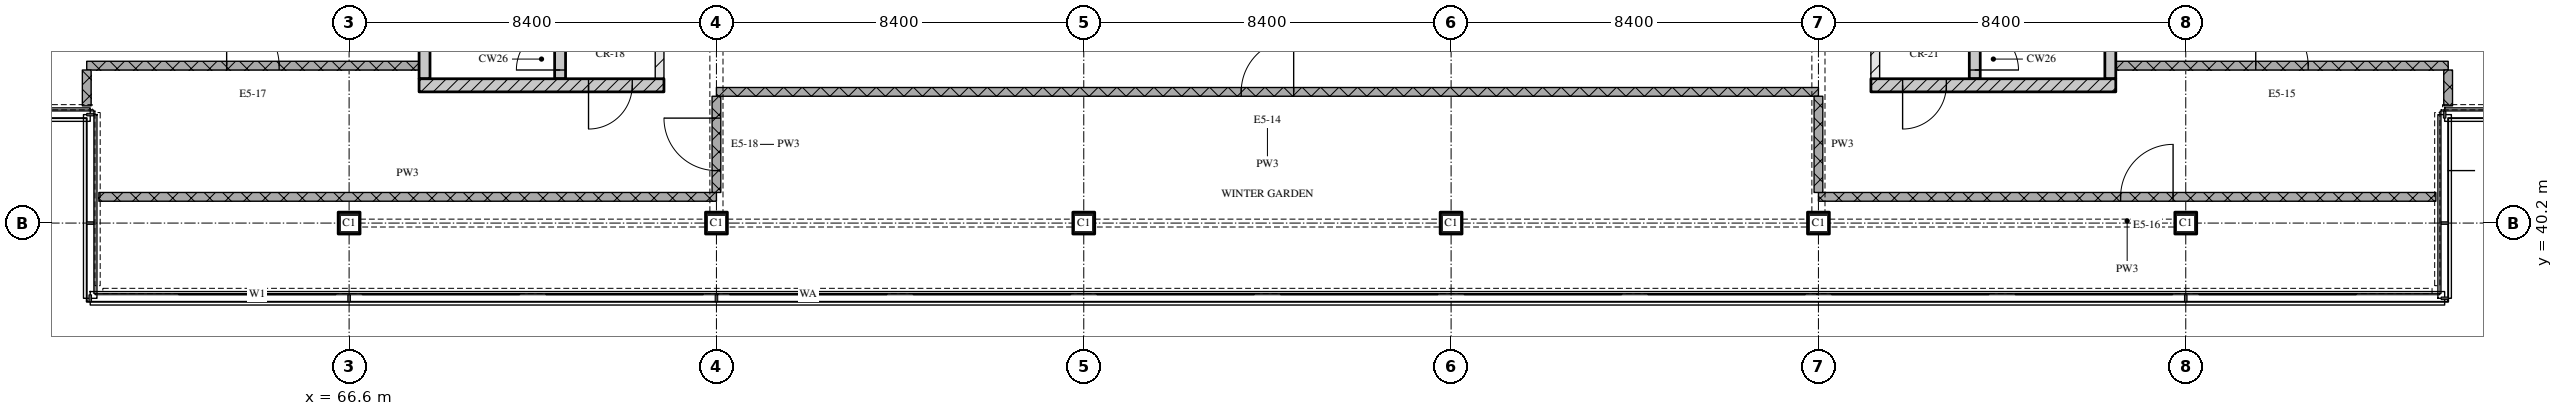
"""IFC4 building model, lengths in metres.
Left out: names, types, materials, properties, quantities, classifications, styles, units other than length and angle.
Written with IfcOpenShell. Run it as: python <this file> out.ifc"""

import sys

from ifc_helpers import new_model, si_unit, direction, frame, frame_2d, origin, origin_2d, place, context, subcontext, project, spatial, rectangle, extrude, element, fill, save


model = new_model("IFC4")
c1 = context("Model", 3, precision=1e-05, world=origin(), true_north=direction((0.0, 1.0)))
c2 = subcontext(c1, "Body", "Model", "MODEL_VIEW")
j1 = project(units=[si_unit("LENGTHUNIT", "METRE"), si_unit("PLANEANGLEUNIT", "RADIAN")], contexts=[c1])
p1 = place(None, origin())
s1 = spatial("IfcSite", under=j1, at=p1, CompositionType="ELEMENT")
p2 = place(p1, origin())
s2 = spatial("IfcBuilding", under=s1, at=p2, CompositionType="ELEMENT")
p3 = place(p2, frame((0.0, 0.0, 288.75)))
s3 = spatial("IfcBuildingStorey", under=s2, at=p3, CompositionType="ELEMENT", Elevation=288.75)
for number, where, z_axis, x_axis in (
    (1, (66.6, 40.2, 0.0), (0.0, 0.0, 1.0), (1.0, 0.0, 0.0)),
    (2, (75.0, 40.2, 0.0), (0.0, 0.0, 1.0), (1.0, 0.0, 0.0)),
    (3, (83.4, 40.2, 0.0), (0.0, 0.0, 1.0), (1.0, 0.0, 0.0)),
    (4, (91.8, 40.2, 0.0), (0.0, 0.0, 1.0), (1.0, 0.0, 0.0)),
    (5, (100.2, 40.2, 0.0), (0.0, 0.0, 1.0), (1.0, 0.0, 0.0)),
    (6, (108.6, 40.2, 0.0), (0.0, 0.0, 1.0), (1.0, 0.0, 0.0)),
):
    element("IfcColumn", number, at=place(p3, frame(where, z_axis=z_axis, x_axis=x_axis)), inside=s3, PredefinedType="COLUMN", context=c2, shape_type="SweptSolid", body=[
        extrude(rectangle(XDim=0.5, YDim=0.5, at=origin_2d()), origin(), (0.0, 0.0, 1.0), 3.6),
    ])
p4 = place(p3, frame((68.2, 43.35, 0.0), z_axis=(0.0, 0.0, 1.0), x_axis=(1.0, 0.0, 0.0)))
e7 = element("IfcWall", 7, at=p4, inside=s3, PredefinedType="SOLIDWALL", context=c2, shape_type="SweptSolid", body=[
    extrude(rectangle(XDim=5.6, YDim=0.3, at=frame_2d((2.8, 0.0))), origin(), (0.0, 0.0, 1.0), 3.32),
])
p5 = place(p4, frame((3.875, 0.0, 0.0)))
e8 = element("IfcOpeningElement", 8, at=p5, cuts=e7, PredefinedType="OPENING", context=c2, shape_type="SweptSolid", body=[
    extrude(rectangle(XDim=1.0, YDim=2.1, at=frame_2d((0.5, 1.05))), frame((0.0, 0.16, 0.0), z_axis=(0.0, -1.0, 0.0), x_axis=(1.0, 0.0, 0.0)), (0.0, 0.0, 1.0), 0.32),
])
p6 = place(p3, frame((68.325, 43.5, 0.0), z_axis=(0.0, 0.0, 1.0), x_axis=(0.0, 1.0, 0.0)))
e9 = element("IfcWall", 9, at=p6, inside=s3, PredefinedType="SOLIDWALL", context=c2, shape_type="SweptSolid", body=[
    extrude(rectangle(XDim=6.9, YDim=0.25, at=frame_2d((3.45, 0.0))), origin(), (0.0, 0.0, 1.0), 3.32),
])
p7 = place(p3, frame((71.425, 43.5, 0.0), z_axis=(0.0, 0.0, 1.0), x_axis=(0.0, 1.0, 0.0)))
e10 = element("IfcWall", 10, at=p7, inside=s3, PredefinedType="SOLIDWALL", context=c2, shape_type="SweptSolid", body=[
    extrude(rectangle(XDim=6.9, YDim=0.25, at=frame_2d((3.45, 0.0))), origin(), (0.0, 0.0, 1.0), 3.32),
])
p8 = place(p7, frame((0.2, 0.0, 0.0)))
e11 = element("IfcOpeningElement", 11, at=p8, cuts=e10, PredefinedType="OPENING", context=c2, shape_type="SweptSolid", body=[
    extrude(rectangle(XDim=1.0, YDim=2.1, at=frame_2d((0.5, 1.05))), frame((0.0, 0.135, 0.0), z_axis=(0.0, -1.0, 0.0), x_axis=(1.0, 0.0, 0.0)), (0.0, 0.0, 1.0), 0.27),
])
p9 = place(p3, frame((73.7, 43.5, 0.0), z_axis=(0.0, 0.0, 1.0), x_axis=(0.0, 1.0, 0.0)))
e12 = element("IfcWall", 12, at=p9, inside=s3, PredefinedType="PARTITIONING", context=c2, shape_type="SweptSolid", body=[
    extrude(rectangle(XDim=6.9, YDim=0.2, at=frame_2d((3.45, 0.0))), origin(), (0.0, 0.0, 1.0), 3.32),
])
p10 = place(p9, frame((1.0, 0.0, 0.0)))
e13 = element("IfcOpeningElement", 13, at=p10, cuts=e12, PredefinedType="OPENING", context=c2, shape_type="SweptSolid", body=[
    extrude(rectangle(XDim=1.0, YDim=2.1, at=frame_2d((0.5, 1.05))), frame((0.0, 0.11, 0.0), z_axis=(0.0, -1.0, 0.0), x_axis=(1.0, 0.0, 0.0)), (0.0, 0.0, 1.0), 0.22),
])
p11 = place(p3, frame((101.4, 43.35, 0.0), z_axis=(0.0, 0.0, 1.0), x_axis=(1.0, 0.0, 0.0)))
e14 = element("IfcWall", 14, at=p11, inside=s3, PredefinedType="SOLIDWALL", context=c2, shape_type="SweptSolid", body=[
    extrude(rectangle(XDim=5.6, YDim=0.3, at=frame_2d((2.8, 0.0))), origin(), (0.0, 0.0, 1.0), 3.32),
])
p12 = place(p11, frame((0.725, 0.0, 0.0)))
e15 = element("IfcOpeningElement", 15, at=p12, cuts=e14, PredefinedType="OPENING", context=c2, shape_type="SweptSolid", body=[
    extrude(rectangle(XDim=1.0, YDim=2.1, at=frame_2d((0.5, 1.05))), frame((0.0, 0.16, 0.0), z_axis=(0.0, -1.0, 0.0), x_axis=(1.0, 0.0, 0.0)), (0.0, 0.0, 1.0), 0.32),
])
p13 = place(p3, frame((101.5, 43.5, 0.0), z_axis=(0.0, 0.0, 1.0), x_axis=(0.0, 1.0, 0.0)))
e16 = element("IfcWall", 16, at=p13, inside=s3, PredefinedType="PARTITIONING", context=c2, shape_type="SweptSolid", body=[
    extrude(rectangle(XDim=6.9, YDim=0.2, at=frame_2d((3.45, 0.0))), origin(), (0.0, 0.0, 1.0), 3.32),
])
p14 = place(p13, frame((1.0, 0.0, 0.0)))
e17 = element("IfcOpeningElement", 17, at=p14, cuts=e16, PredefinedType="OPENING", context=c2, shape_type="SweptSolid", body=[
    extrude(rectangle(XDim=1.0, YDim=2.1, at=frame_2d((0.5, 1.05))), frame((0.0, 0.11, 0.0), z_axis=(0.0, -1.0, 0.0), x_axis=(1.0, 0.0, 0.0)), (0.0, 0.0, 1.0), 0.22),
])
p15 = place(p3, frame((103.775, 43.5, 0.0), z_axis=(0.0, 0.0, 1.0), x_axis=(0.0, 1.0, 0.0)))
e18 = element("IfcWall", 18, at=p15, inside=s3, PredefinedType="SOLIDWALL", context=c2, shape_type="SweptSolid", body=[
    extrude(rectangle(XDim=6.9, YDim=0.25, at=frame_2d((3.45, 0.0))), origin(), (0.0, 0.0, 1.0), 3.32),
])
p16 = place(p15, frame((0.2, 0.0, 0.0)))
e19 = element("IfcOpeningElement", 19, at=p16, cuts=e18, PredefinedType="OPENING", context=c2, shape_type="SweptSolid", body=[
    extrude(rectangle(XDim=1.0, YDim=2.1, at=frame_2d((0.5, 1.05))), frame((0.0, 0.135, 0.0), z_axis=(0.0, -1.0, 0.0), x_axis=(1.0, 0.0, 0.0)), (0.0, 0.0, 1.0), 0.27),
])
p17 = place(p3, frame((106.875, 43.5, 0.0), z_axis=(0.0, 0.0, 1.0), x_axis=(0.0, 1.0, 0.0)))
e20 = element("IfcWall", 20, at=p17, inside=s3, PredefinedType="SOLIDWALL", context=c2, shape_type="SweptSolid", body=[
    extrude(rectangle(XDim=6.9, YDim=0.25, at=frame_2d((3.45, 0.0))), origin(), (0.0, 0.0, 1.0), 3.32),
])
p18 = place(p3, frame((60.88, 40.8, 0.0), z_axis=(0.0, 0.0, 1.0), x_axis=(1.0, 0.0, 0.0)))
e21 = element("IfcWall", 21, at=p18, inside=s3, PredefinedType="PARTITIONING", context=c2, shape_type="SweptSolid", body=[
    extrude(rectangle(XDim=14.12, YDim=0.2, at=frame_2d((7.06, 0.0))), origin(), (0.0, 0.0, 1.0), 3.32),
])
p19 = place(p3, frame((114.32, 40.8, 0.0), z_axis=(0.0, 0.0, 1.0), x_axis=(-1.0, 0.0, 0.0)))
e22 = element("IfcWall", 22, at=p19, inside=s3, PredefinedType="PARTITIONING", context=c2, shape_type="SweptSolid", body=[
    extrude(rectangle(XDim=14.12, YDim=0.2, at=frame_2d((7.06, 0.0))), origin(), (0.0, 0.0, 1.0), 3.32),
])
p20 = place(p19, frame((6.01, 0.0, 0.0)))
e23 = element("IfcOpeningElement", 23, at=p20, cuts=e22, PredefinedType="OPENING", context=c2, shape_type="SweptSolid", body=[
    extrude(rectangle(XDim=1.2, YDim=2.1, at=frame_2d((0.6, 1.05))), frame((0.0, 0.11, 0.0), z_axis=(0.0, -1.0, 0.0), x_axis=(1.0, 0.0, 0.0)), (0.0, 0.0, 1.0), 0.22),
])
p21 = place(p3, frame((100.2, 43.2, 0.0), z_axis=(0.0, 0.0, 1.0), x_axis=(-1.0, 0.0, 0.0)))
e24 = element("IfcWall", 24, at=p21, inside=s3, PredefinedType="PARTITIONING", context=c2, shape_type="SweptSolid", body=[
    extrude(rectangle(XDim=25.2, YDim=0.2, at=frame_2d((12.6, 0.0))), origin(), (0.0, 0.0, 1.0), 3.32),
])
p22 = place(p21, frame((12.0, 0.0, 0.0)))
e25 = element("IfcOpeningElement", 25, at=p22, cuts=e24, PredefinedType="OPENING", context=c2, shape_type="SweptSolid", body=[
    extrude(rectangle(XDim=1.2, YDim=2.1, at=frame_2d((0.6, 1.05))), frame((0.0, 0.11, 0.0), z_axis=(0.0, -1.0, 0.0), x_axis=(1.0, 0.0, 0.0)), (0.0, 0.0, 1.0), 0.22),
])
p23 = place(p3, frame((60.6, 43.8, 0.0), z_axis=(0.0, 0.0, 1.0), x_axis=(1.0, 0.0, 0.0)))
e26 = element("IfcWall", 26, at=p23, inside=s3, PredefinedType="PARTITIONING", context=c2, shape_type="SweptSolid", body=[
    extrude(rectangle(XDim=7.6, YDim=0.2, at=frame_2d((3.8, 0.0))), origin(), (0.0, 0.0, 1.0), 3.32),
])
p24 = place(p23, frame((3.2, 0.0, 0.0)))
e27 = element("IfcOpeningElement", 27, at=p24, cuts=e26, PredefinedType="OPENING", context=c2, shape_type="SweptSolid", body=[
    extrude(rectangle(XDim=1.2, YDim=2.1, at=frame_2d((0.6, 1.05))), frame((0.0, 0.11, 0.0), z_axis=(0.0, -1.0, 0.0), x_axis=(1.0, 0.0, 0.0)), (0.0, 0.0, 1.0), 0.22),
])
p25 = place(p3, frame((107.0, 43.8, 0.0), z_axis=(0.0, 0.0, 1.0), x_axis=(1.0, 0.0, 0.0)))
e28 = element("IfcWall", 28, at=p25, inside=s3, PredefinedType="PARTITIONING", context=c2, shape_type="SweptSolid", body=[
    extrude(rectangle(XDim=7.6, YDim=0.2, at=frame_2d((3.8, 0.0))), origin(), (0.0, 0.0, 1.0), 3.32),
])
p26 = place(p25, frame((3.2, 0.0, 0.0)))
e29 = element("IfcOpeningElement", 29, at=p26, cuts=e28, PredefinedType="OPENING", context=c2, shape_type="SweptSolid", body=[
    extrude(rectangle(XDim=1.2, YDim=2.1, at=frame_2d((0.6, 1.05))), frame((0.0, 0.11, 0.0), z_axis=(0.0, -1.0, 0.0), x_axis=(1.0, 0.0, 0.0)), (0.0, 0.0, 1.0), 0.22),
])
p27 = place(p3, frame((60.6, 43.7, 0.0), z_axis=(0.0, 0.0, 1.0), x_axis=(0.0, -1.0, 0.0)))
e30 = element("IfcWall", 30, at=p27, inside=s3, PredefinedType="PARTITIONING", context=c2, shape_type="SweptSolid", body=[
    extrude(rectangle(XDim=0.82, YDim=0.2, at=frame_2d((0.41, 0.0))), origin(), (0.0, 0.0, 1.0), 3.32),
])
p28 = place(p3, frame((75.0, 43.1, 0.0), z_axis=(0.0, 0.0, 1.0), x_axis=(0.0, -1.0, 0.0)))
e31 = element("IfcWall", 31, at=p28, inside=s3, PredefinedType="PARTITIONING", context=c2, shape_type="SweptSolid", body=[
    extrude(rectangle(XDim=2.2, YDim=0.2, at=frame_2d((1.1, 0.0))), origin(), (0.0, 0.0, 1.0), 2.53),
])
p29 = place(p28, frame((0.5, 0.0, 0.0)))
e32 = element("IfcOpeningElement", 32, at=p29, cuts=e31, PredefinedType="OPENING", context=c2, shape_type="SweptSolid", body=[
    extrude(rectangle(XDim=1.2, YDim=2.1, at=frame_2d((0.6, 1.05))), frame((0.0, 0.11, 0.0), z_axis=(0.0, -1.0, 0.0), x_axis=(1.0, 0.0, 0.0)), (0.0, 0.0, 1.0), 0.22),
])
p30 = place(p3, frame((100.2, 43.1, 0.0), z_axis=(0.0, 0.0, 1.0), x_axis=(0.0, -1.0, 0.0)))
e33 = element("IfcWall", 33, at=p30, inside=s3, PredefinedType="PARTITIONING", context=c2, shape_type="SweptSolid", body=[
    extrude(rectangle(XDim=2.2, YDim=0.2, at=frame_2d((1.1, 0.0))), origin(), (0.0, 0.0, 1.0), 2.53),
])
p31 = place(p3, frame((114.6, 43.7, 0.0), z_axis=(0.0, 0.0, 1.0), x_axis=(0.0, -1.0, 0.0)))
e34 = element("IfcWall", 34, at=p31, inside=s3, PredefinedType="PARTITIONING", context=c2, shape_type="SweptSolid", body=[
    extrude(rectangle(XDim=0.82, YDim=0.2, at=frame_2d((0.41, 0.0))), origin(), (0.0, 0.0, 1.0), 3.32),
])
p32 = place(p5, origin())
e35 = element("IfcDoor", 35, at=p32, inside=s3, OperationType="SINGLE_SWING_RIGHT", PredefinedType="DOOR", context=c2, shape_type="SweptSolid", body=[
    extrude(rectangle(XDim=1.0, YDim=2.1, at=frame_2d((0.5, 1.05))), frame((0.0, 0.025, 0.0), z_axis=(0.0, -1.0, 0.0), x_axis=(1.0, 0.0, 0.0)), (0.0, 0.0, 1.0), 0.05),
])
fill(e8, e35)
p33 = place(p8, origin())
e36 = element("IfcDoor", 36, at=p33, inside=s3, OperationType="SINGLE_SWING_LEFT", PredefinedType="DOOR", context=c2, shape_type="SweptSolid", body=[
    extrude(rectangle(XDim=1.0, YDim=2.1, at=frame_2d((0.5, 1.05))), frame((0.0, 0.025, 0.0), z_axis=(0.0, -1.0, 0.0), x_axis=(1.0, 0.0, 0.0)), (0.0, 0.0, 1.0), 0.05),
])
fill(e11, e36)
p34 = place(p12, origin())
e37 = element("IfcDoor", 37, at=p34, inside=s3, OperationType="SINGLE_SWING_RIGHT", PredefinedType="DOOR", context=c2, shape_type="SweptSolid", body=[
    extrude(rectangle(XDim=1.0, YDim=2.1, at=frame_2d((0.5, 1.05))), frame((0.0, 0.025, 0.0), z_axis=(0.0, -1.0, 0.0), x_axis=(1.0, 0.0, 0.0)), (0.0, 0.0, 1.0), 0.05),
])
fill(e15, e37)
p35 = place(p16, origin())
e38 = element("IfcDoor", 38, at=p35, inside=s3, OperationType="SINGLE_SWING_RIGHT", PredefinedType="DOOR", context=c2, shape_type="SweptSolid", body=[
    extrude(rectangle(XDim=1.0, YDim=2.1, at=frame_2d((0.5, 1.05))), frame((0.0, 0.025, 0.0), z_axis=(0.0, -1.0, 0.0), x_axis=(1.0, 0.0, 0.0)), (0.0, 0.0, 1.0), 0.05),
])
fill(e19, e38)
p36 = place(p20, origin())
e39 = element("IfcDoor", 39, at=p36, inside=s3, OperationType="SINGLE_SWING_RIGHT", PredefinedType="DOOR", context=c2, shape_type="SweptSolid", body=[
    extrude(rectangle(XDim=1.2, YDim=2.1, at=frame_2d((0.6, 1.05))), frame((0.0, 0.025, 0.0), z_axis=(0.0, -1.0, 0.0), x_axis=(1.0, 0.0, 0.0)), (0.0, 0.0, 1.0), 0.05),
])
fill(e23, e39)
p37 = place(p22, origin())
e40 = element("IfcDoor", 40, at=p37, inside=s3, OperationType="SINGLE_SWING_RIGHT", PredefinedType="DOOR", context=c2, shape_type="SweptSolid", body=[
    extrude(rectangle(XDim=1.2, YDim=2.1, at=frame_2d((0.6, 1.05))), frame((0.0, 0.025, 0.0), z_axis=(0.0, -1.0, 0.0), x_axis=(1.0, 0.0, 0.0)), (0.0, 0.0, 1.0), 0.05),
])
fill(e25, e40)
p38 = place(p24, origin())
e41 = element("IfcDoor", 41, at=p38, inside=s3, OperationType="SINGLE_SWING_LEFT", PredefinedType="DOOR", context=c2, shape_type="SweptSolid", body=[
    extrude(rectangle(XDim=1.2, YDim=2.1, at=frame_2d((0.6, 1.05))), frame((0.0, 0.025, 0.0), z_axis=(0.0, -1.0, 0.0), x_axis=(1.0, 0.0, 0.0)), (0.0, 0.0, 1.0), 0.05),
])
fill(e27, e41)
p39 = place(p26, origin())
e42 = element("IfcDoor", 42, at=p39, inside=s3, OperationType="SINGLE_SWING_LEFT", PredefinedType="DOOR", context=c2, shape_type="SweptSolid", body=[
    extrude(rectangle(XDim=1.2, YDim=2.1, at=frame_2d((0.6, 1.05))), frame((0.0, 0.025, 0.0), z_axis=(0.0, -1.0, 0.0), x_axis=(1.0, 0.0, 0.0)), (0.0, 0.0, 1.0), 0.05),
])
fill(e29, e42)
p40 = place(p29, origin())
e43 = element("IfcDoor", 43, at=p40, inside=s3, OperationType="SINGLE_SWING_RIGHT", PredefinedType="DOOR", context=c2, shape_type="SweptSolid", body=[
    extrude(rectangle(XDim=1.2, YDim=2.1, at=frame_2d((0.6, 1.05))), frame((0.0, 0.025, 0.0), z_axis=(0.0, -1.0, 0.0), x_axis=(1.0, 0.0, 0.0)), (0.0, 0.0, 1.0), 0.05),
])
fill(e32, e43)
save(model, sys.argv[1])
